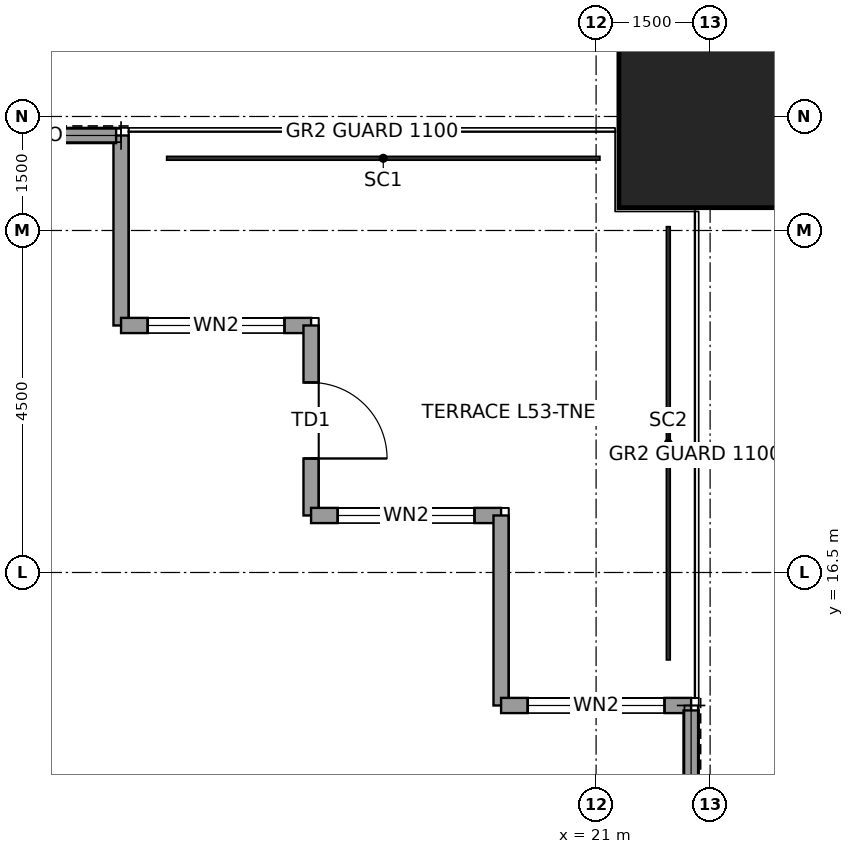
"""IFC4 building model, lengths in metres.
Left out: names, types, materials, properties, quantities, classifications, styles, units other than length and angle.
Written with IfcOpenShell. Run it as: python <this file> out.ifc"""

import sys

from ifc_helpers import new_model, si_unit, direction, frame, frame_2d, origin, origin_2d, place, context, subcontext, project, spatial, rectangle, hollow_rectangle, extrude, element, fill, save


model = new_model("IFC4")
c1 = context("Model", 3, precision=1e-05, world=origin(), true_north=direction((0.0, 1.0)))
c2 = subcontext(c1, "Body", "Model", "MODEL_VIEW")
j1 = project(units=[si_unit("LENGTHUNIT", "METRE"), si_unit("PLANEANGLEUNIT", "RADIAN")], contexts=[c1])
p1 = place(None, origin())
s1 = spatial("IfcSite", under=j1, at=p1, CompositionType="ELEMENT")
p2 = place(p1, origin())
s2 = spatial("IfcBuilding", under=s1, at=p2, CompositionType="ELEMENT")
p3 = place(p2, frame((0.0, 0.0, 245.9)))
s3 = spatial("IfcBuildingStorey", under=s2, at=p3, CompositionType="ELEMENT", Elevation=245.9)
p4 = place(p3, frame((22.5, 22.5, 0.0), z_axis=(0.0, 0.0, 1.0), x_axis=(1.0, 0.0, 0.0)))
e1 = element("IfcColumn", 1, at=p4, inside=s3, PredefinedType="COLUMN", context=c2, shape_type="SweptSolid", body=[
    extrude(hollow_rectangle(XDim=2.4, YDim=2.4, WallThickness=0.12, at=origin_2d()), origin(), (0.0, 0.0, 1.0), 4.0),
])
p5 = place(p3, frame((14.75, 22.25, 0.0), z_axis=(0.0, 0.0, 1.0), x_axis=(0.0, -1.0, 0.0)))
e2 = element("IfcWall", 2, at=p5, inside=s3, PredefinedType="SOLIDWALL", context=c2, shape_type="SweptSolid", body=[
    extrude(rectangle(XDim=2.5, YDim=0.2, at=frame_2d((1.25, 0.0))), origin(), (0.0, 0.0, 1.0), 3.85),
])
p6 = place(p3, frame((14.75, 19.75, 0.0), z_axis=(0.0, 0.0, 1.0), x_axis=(1.0, 0.0, 0.0)))
e3 = element("IfcWall", 3, at=p6, inside=s3, PredefinedType="SOLIDWALL", context=c2, shape_type="SweptSolid", body=[
    extrude(rectangle(XDim=2.5, YDim=0.2, at=frame_2d((1.25, 0.0))), origin(), (0.0, 0.0, 1.0), 3.85),
])
p7 = place(p6, frame((0.35, 0.0, 0.3)))
e4 = element("IfcOpeningElement", 4, at=p7, cuts=e3, PredefinedType="OPENING", context=c2, shape_type="SweptSolid", body=[
    extrude(rectangle(XDim=1.8, YDim=2.4, at=frame_2d((0.9, 1.2))), frame((0.0, 0.11, 0.0), z_axis=(0.0, -1.0, 0.0), x_axis=(1.0, 0.0, 0.0)), (0.0, 0.0, 1.0), 0.22),
])
p8 = place(p3, frame((17.25, 19.75, 0.0), z_axis=(0.0, 0.0, 1.0), x_axis=(0.0, -1.0, 0.0)))
e5 = element("IfcWall", 5, at=p8, inside=s3, PredefinedType="SOLIDWALL", context=c2, shape_type="SweptSolid", body=[
    extrude(rectangle(XDim=2.5, YDim=0.2, at=frame_2d((1.25, 0.0))), origin(), (0.0, 0.0, 1.0), 3.85),
])
p9 = place(p8, frame((0.75, 0.0, 0.0)))
e6 = element("IfcOpeningElement", 6, at=p9, cuts=e5, PredefinedType="OPENING", context=c2, shape_type="SweptSolid", body=[
    extrude(rectangle(XDim=1.0, YDim=2.4, at=frame_2d((0.5, 1.2))), frame((0.0, 0.11, 0.0), z_axis=(0.0, -1.0, 0.0), x_axis=(1.0, 0.0, 0.0)), (0.0, 0.0, 1.0), 0.22),
])
p10 = place(p3, frame((17.25, 17.25, 0.0), z_axis=(0.0, 0.0, 1.0), x_axis=(1.0, 0.0, 0.0)))
e7 = element("IfcWall", 7, at=p10, inside=s3, PredefinedType="SOLIDWALL", context=c2, shape_type="SweptSolid", body=[
    extrude(rectangle(XDim=2.5, YDim=0.2, at=frame_2d((1.25, 0.0))), origin(), (0.0, 0.0, 1.0), 3.85),
])
p11 = place(p10, frame((0.35, 0.0, 0.3)))
e8 = element("IfcOpeningElement", 8, at=p11, cuts=e7, PredefinedType="OPENING", context=c2, shape_type="SweptSolid", body=[
    extrude(rectangle(XDim=1.8, YDim=2.4, at=frame_2d((0.9, 1.2))), frame((0.0, 0.11, 0.0), z_axis=(0.0, -1.0, 0.0), x_axis=(1.0, 0.0, 0.0)), (0.0, 0.0, 1.0), 0.22),
])
p12 = place(p3, frame((19.75, 17.25, 0.0), z_axis=(0.0, 0.0, 1.0), x_axis=(0.0, -1.0, 0.0)))
e9 = element("IfcWall", 9, at=p12, inside=s3, PredefinedType="SOLIDWALL", context=c2, shape_type="SweptSolid", body=[
    extrude(rectangle(XDim=2.5, YDim=0.2, at=frame_2d((1.25, 0.0))), origin(), (0.0, 0.0, 1.0), 3.85),
])
p13 = place(p3, frame((19.75, 14.75, 0.0), z_axis=(0.0, 0.0, 1.0), x_axis=(1.0, 0.0, 0.0)))
e10 = element("IfcWall", 10, at=p13, inside=s3, PredefinedType="SOLIDWALL", context=c2, shape_type="SweptSolid", body=[
    extrude(rectangle(XDim=2.5, YDim=0.2, at=frame_2d((1.25, 0.0))), origin(), (0.0, 0.0, 1.0), 3.85),
])
p14 = place(p13, frame((0.35, 0.0, 0.3)))
e11 = element("IfcOpeningElement", 11, at=p14, cuts=e10, PredefinedType="OPENING", context=c2, shape_type="SweptSolid", body=[
    extrude(rectangle(XDim=1.8, YDim=2.4, at=frame_2d((0.9, 1.2))), frame((0.0, 0.11, 0.0), z_axis=(0.0, -1.0, 0.0), x_axis=(1.0, 0.0, 0.0)), (0.0, 0.0, 1.0), 0.22),
])
for number, where, z_axis, x_axis in (
    (12, (12.398, 22.25, 0.0), (0.0, 0.0, 1.0), (1.0, 0.0, 0.0)),
    (13, (22.25, 14.685, 0.0), (0.0, 0.0, 1.0), (0.0, -1.0, 0.0)),
):
    element("IfcWall", number, at=place(p3, frame(where, z_axis=z_axis, x_axis=x_axis)), inside=s3, PredefinedType="SOLIDWALL", context=c2, shape_type="SweptSolid", body=[
        extrude(rectangle(XDim=2.287, YDim=0.2, at=frame_2d((1.144, 0.0))), origin(), (0.0, 0.0, 1.0), 3.85),
    ])
p15 = place(p7, origin())
e14 = element("IfcWindow", 14, at=p15, inside=s3, PartitioningType="SINGLE_PANEL", PredefinedType="WINDOW", context=c2, shape_type="SweptSolid", body=[
    extrude(rectangle(XDim=1.8, YDim=2.4, at=frame_2d((0.9, 1.2))), frame((0.0, 0.03, 0.0), z_axis=(0.0, -1.0, 0.0), x_axis=(1.0, 0.0, 0.0)), (0.0, 0.0, 1.0), 0.06),
])
fill(e4, e14)
p16 = place(p9, origin())
e15 = element("IfcDoor", 15, at=p16, inside=s3, OperationType="SINGLE_SWING_RIGHT", PredefinedType="DOOR", context=c2, shape_type="SweptSolid", body=[
    extrude(rectangle(XDim=1.0, YDim=2.4, at=frame_2d((0.5, 1.2))), frame((0.0, 0.025, 0.0), z_axis=(0.0, -1.0, 0.0), x_axis=(1.0, 0.0, 0.0)), (0.0, 0.0, 1.0), 0.05),
])
fill(e6, e15)
p17 = place(p11, origin())
e16 = element("IfcWindow", 16, at=p17, inside=s3, PartitioningType="SINGLE_PANEL", PredefinedType="WINDOW", context=c2, shape_type="SweptSolid", body=[
    extrude(rectangle(XDim=1.8, YDim=2.4, at=frame_2d((0.9, 1.2))), frame((0.0, 0.03, 0.0), z_axis=(0.0, -1.0, 0.0), x_axis=(1.0, 0.0, 0.0)), (0.0, 0.0, 1.0), 0.06),
])
fill(e8, e16)
p18 = place(p14, origin())
e17 = element("IfcWindow", 17, at=p18, inside=s3, PartitioningType="SINGLE_PANEL", PredefinedType="WINDOW", context=c2, shape_type="SweptSolid", body=[
    extrude(rectangle(XDim=1.8, YDim=2.4, at=frame_2d((0.9, 1.2))), frame((0.0, 0.03, 0.0), z_axis=(0.0, -1.0, 0.0), x_axis=(1.0, 0.0, 0.0)), (0.0, 0.0, 1.0), 0.06),
])
fill(e11, e17)
save(model, sys.argv[1])
